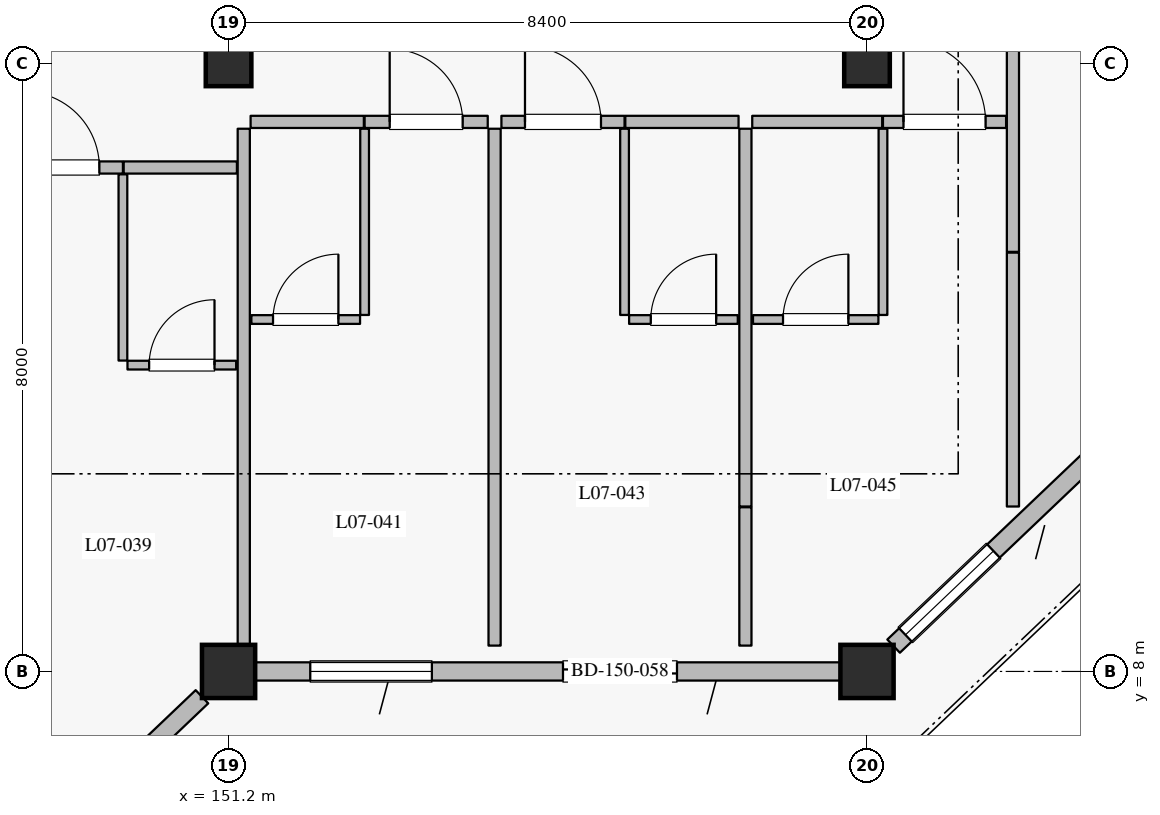
"""IFC4 building model, lengths in metres.
Left out: names, types, materials, properties, quantities, classifications, styles, units other than length and angle.
Written with IfcOpenShell. Run it as: python <this file> out.ifc"""

import sys

from ifc_helpers import new_model, si_unit, direction, frame, frame_2d, origin, origin_2d, place, context, subcontext, project, spatial, rectangle, extrude, element, fill, save


model = new_model("IFC4")
c1 = context("Model", 3, precision=1e-05, world=origin(), true_north=direction((0.0, 1.0)))
c2 = subcontext(c1, "Body", "Model", "MODEL_VIEW")
j1 = project(units=[si_unit("LENGTHUNIT", "METRE"), si_unit("PLANEANGLEUNIT", "RADIAN")], contexts=[c1])
p1 = place(None, origin())
s1 = spatial("IfcSite", under=j1, at=p1, CompositionType="ELEMENT")
p2 = place(p1, origin())
s2 = spatial("IfcBuilding", under=s1, at=p2, CompositionType="ELEMENT")
p3 = place(p2, frame((0.0, 0.0, 32.4)))
s3 = spatial("IfcBuildingStorey", under=s2, at=p3, CompositionType="ELEMENT", Elevation=32.4)
for number, where, z_axis, x_axis in (
    (1, (151.2, 8.0, 0.0), (0.0, 0.0, 1.0), (1.0, 0.0, 0.0)),
    (2, (159.6, 8.0, 0.0), (0.0, 0.0, 1.0), (1.0, 0.0, 0.0)),
):
    element("IfcColumn", number, at=place(p3, frame(where, z_axis=z_axis, x_axis=x_axis)), inside=s3, PredefinedType="COLUMN", context=c2, shape_type="SweptSolid", body=[
        extrude(rectangle(XDim=0.7, YDim=0.7, at=origin_2d()), origin(), (0.0, 0.0, 1.0), 3.6),
    ])
for number, where, z_axis, x_axis in (
    (3, (151.2, 16.0, 0.0), (0.0, 0.0, 1.0), (1.0, 0.0, 0.0)),
    (4, (159.6, 16.0, 0.0), (0.0, 0.0, 1.0), (1.0, 0.0, 0.0)),
):
    element("IfcColumn", number, at=place(p3, frame(where, z_axis=z_axis, x_axis=x_axis)), inside=s3, PredefinedType="COLUMN", context=c2, shape_type="SweptSolid", body=[
        extrude(rectangle(XDim=0.6, YDim=0.6, at=origin_2d()), origin(), (0.0, 0.0, 1.0), 3.6),
    ])
p4 = place(p3, frame((150.85, 7.667, 0.0), z_axis=(0.0, 0.0, 1.0), x_axis=(-0.724116091282, -0.689678103427, 0.0)))
e5 = element("IfcWall", 5, at=p4, inside=s3, PredefinedType="SOLIDWALL", context=c2, shape_type="SweptSolid", body=[
    extrude(rectangle(XDim=10.634, YDim=0.24, at=frame_2d((5.317, 0.0))), origin(), (0.0, 0.0, 1.0), 2.94),
])
p5 = place(p4, frame((1.08, 0.0, 0.0)))
e6 = element("IfcOpeningElement", 6, at=p5, cuts=e5, PredefinedType="OPENING", context=c2, shape_type="SweptSolid", body=[
    extrude(rectangle(XDim=1.5, YDim=2.25, at=frame_2d((0.75, 1.125))), frame((0.0, 0.13, 0.0), z_axis=(0.0, -1.0, 0.0), x_axis=(1.0, 0.0, 0.0)), (0.0, 0.0, 1.0), 0.26),
])
p6 = place(p4, frame((5.276, 0.0, 0.8)))
e7 = element("IfcOpeningElement", 7, at=p6, cuts=e5, PredefinedType="OPENING", context=c2, shape_type="SweptSolid", body=[
    extrude(rectangle(XDim=1.6, YDim=1.6, at=frame_2d((0.8, 0.8))), frame((0.0, 0.13, 0.0), z_axis=(0.0, -1.0, 0.0), x_axis=(1.0, 0.0, 0.0)), (0.0, 0.0, 1.0), 0.26),
])
p7 = place(p4, frame((8.764, 0.0, 0.8)))
e8 = element("IfcOpeningElement", 8, at=p7, cuts=e5, PredefinedType="OPENING", context=c2, shape_type="SweptSolid", body=[
    extrude(rectangle(XDim=1.6, YDim=1.6, at=frame_2d((0.8, 0.8))), frame((0.0, 0.13, 0.0), z_axis=(0.0, -1.0, 0.0), x_axis=(1.0, 0.0, 0.0)), (0.0, 0.0, 1.0), 0.26),
])
p8 = place(p3, frame((159.25, 8.0, 0.0), z_axis=(0.0, 0.0, 1.0), x_axis=(-1.0, 0.0, 0.0)))
e9 = element("IfcWall", 9, at=p8, inside=s3, PredefinedType="SOLIDWALL", context=c2, shape_type="SweptSolid", body=[
    extrude(rectangle(XDim=7.7, YDim=0.24, at=frame_2d((3.85, 0.0))), origin(), (0.0, 0.0, 1.0), 2.94),
])
p9 = place(p8, frame((2.15, 0.0, 0.0)))
e10 = element("IfcOpeningElement", 10, at=p9, cuts=e9, PredefinedType="OPENING", context=c2, shape_type="SweptSolid", body=[
    extrude(rectangle(XDim=1.5, YDim=2.25, at=frame_2d((0.75, 1.125))), frame((0.0, 0.13, 0.0), z_axis=(0.0, -1.0, 0.0), x_axis=(1.0, 0.0, 0.0)), (0.0, 0.0, 1.0), 0.26),
])
p10 = place(p8, frame((5.375, 0.0, 0.8)))
e11 = element("IfcOpeningElement", 11, at=p10, cuts=e9, PredefinedType="OPENING", context=c2, shape_type="SweptSolid", body=[
    extrude(rectangle(XDim=1.6, YDim=1.6, at=frame_2d((0.8, 0.8))), frame((0.0, 0.13, 0.0), z_axis=(0.0, -1.0, 0.0), x_axis=(1.0, 0.0, 0.0)), (0.0, 0.0, 1.0), 0.26),
])
p11 = place(p3, frame((167.65, 15.667, 0.0), z_axis=(0.0, 0.0, 1.0), x_axis=(-0.724105170588, -0.689689569247, 0.0)))
e12 = element("IfcWall", 12, at=p11, inside=s3, PredefinedType="SOLIDWALL", context=c2, shape_type="SweptSolid", body=[
    extrude(rectangle(XDim=10.634, YDim=0.24, at=frame_2d((5.317, 0.0))), origin(), (0.0, 0.0, 1.0), 2.89),
])
p12 = place(p11, frame((0.983, 0.0, 0.0)))
e13 = element("IfcOpeningElement", 13, at=p12, cuts=e12, PredefinedType="OPENING", context=c2, shape_type="SweptSolid", body=[
    extrude(rectangle(XDim=1.5, YDim=2.25, at=frame_2d((0.75, 1.125))), frame((0.0, 0.13, 0.0), z_axis=(0.0, -1.0, 0.0), x_axis=(1.0, 0.0, 0.0)), (0.0, 0.0, 1.0), 0.26),
])
p13 = place(p11, frame((5.035, 0.0, 0.8)))
e14 = element("IfcOpeningElement", 14, at=p13, cuts=e12, PredefinedType="OPENING", context=c2, shape_type="SweptSolid", body=[
    extrude(rectangle(XDim=2.0, YDim=1.75, at=frame_2d((1.0, 0.875))), frame((0.0, 0.13, 0.0), z_axis=(0.0, -1.0, 0.0), x_axis=(1.0, 0.0, 0.0)), (0.0, 0.0, 1.0), 0.26),
])
p14 = place(p11, frame((8.819, 0.0, 0.8)))
e15 = element("IfcOpeningElement", 15, at=p14, cuts=e12, PredefinedType="OPENING", context=c2, shape_type="SweptSolid", body=[
    extrude(rectangle(XDim=1.6, YDim=1.6, at=frame_2d((0.8, 0.8))), frame((0.0, 0.13, 0.0), z_axis=(0.0, -1.0, 0.0), x_axis=(1.0, 0.0, 0.0)), (0.0, 0.0, 1.0), 0.26),
])
p15 = place(p3, frame((148.19, 14.63, 0.0), z_axis=(0.0, 0.0, 1.0), x_axis=(1.0, 0.0, 0.0)))
e16 = element("IfcWall", 16, at=p15, inside=s3, PredefinedType="PARTITIONING", context=c2, shape_type="SweptSolid", body=[
    extrude(rectangle(XDim=1.62, YDim=0.16, at=frame_2d((0.81, 0.0))), origin(), (0.0, 0.0, 1.0), 3.335),
])
p16 = place(p15, frame((0.31, 0.0, 0.0)))
e17 = element("IfcOpeningElement", 17, at=p16, cuts=e16, PredefinedType="OPENING", context=c2, shape_type="SweptSolid", body=[
    extrude(rectangle(XDim=1.0, YDim=2.25, at=frame_2d((0.5, 1.125))), frame((0.0, 0.09, 0.0), z_axis=(0.0, -1.0, 0.0), x_axis=(1.0, 0.0, 0.0)), (0.0, 0.0, 1.0), 0.18),
])
p17 = place(p3, frame((149.82, 14.63, 0.0), z_axis=(0.0, 0.0, 1.0), x_axis=(1.0, 0.0, 0.0)))
e18 = element("IfcWall", 18, at=p17, inside=s3, PredefinedType="PARTITIONING", context=c2, shape_type="SweptSolid", body=[
    extrude(rectangle(XDim=1.49, YDim=0.16, at=frame_2d((0.745, 0.0))), origin(), (0.0, 0.0, 1.0), 3.335),
])
p18 = place(p3, frame((149.81, 12.09, 0.0), z_axis=(0.0, 0.0, 1.0), x_axis=(0.0, 1.0, 0.0)))
e19 = element("IfcWall", 19, at=p18, inside=s3, PredefinedType="PARTITIONING", context=c2, shape_type="SweptSolid", body=[
    extrude(rectangle(XDim=2.45, YDim=0.115, at=frame_2d((1.225, 0.0))), origin(), (0.0, 0.0, 1.0), 3.335),
])
p19 = place(p3, frame((149.87, 12.03, 0.0), z_axis=(0.0, 0.0, 1.0), x_axis=(1.0, 0.0, 0.0)))
e20 = element("IfcWall", 20, at=p19, inside=s3, PredefinedType="PARTITIONING", context=c2, shape_type="SweptSolid", body=[
    extrude(rectangle(XDim=1.43, YDim=0.115, at=frame_2d((0.715, 0.0))), origin(), (0.0, 0.0, 1.0), 3.335),
])
p20 = place(p19, frame((0.285, 0.0, 0.0)))
e21 = element("IfcOpeningElement", 21, at=p20, cuts=e20, PredefinedType="OPENING", context=c2, shape_type="SweptSolid", body=[
    extrude(rectangle(XDim=0.86, YDim=2.12, at=frame_2d((0.43, 1.06))), frame((0.0, 0.067, 0.0), z_axis=(0.0, -1.0, 0.0), x_axis=(1.0, 0.0, 0.0)), (0.0, 0.0, 1.0), 0.135),
])
p21 = place(p3, frame((151.49, 15.23, 0.0), z_axis=(0.0, 0.0, 1.0), x_axis=(1.0, 0.0, 0.0)))
e22 = element("IfcWall", 22, at=p21, inside=s3, PredefinedType="PARTITIONING", context=c2, shape_type="SweptSolid", body=[
    extrude(rectangle(XDim=1.49, YDim=0.16, at=frame_2d((0.745, 0.0))), origin(), (0.0, 0.0, 1.0), 3.335),
])
p22 = place(p3, frame((152.99, 15.23, 0.0), z_axis=(0.0, 0.0, 1.0), x_axis=(1.0, 0.0, 0.0)))
e23 = element("IfcWall", 23, at=p22, inside=s3, PredefinedType="PARTITIONING", context=c2, shape_type="SweptSolid", body=[
    extrude(rectangle(XDim=1.62, YDim=0.16, at=frame_2d((0.81, 0.0))), origin(), (0.0, 0.0, 1.0), 3.335),
])
p23 = place(p22, frame((0.33, 0.0, 0.0)))
e24 = element("IfcOpeningElement", 24, at=p23, cuts=e23, PredefinedType="OPENING", context=c2, shape_type="SweptSolid", body=[
    extrude(rectangle(XDim=0.96, YDim=2.2, at=frame_2d((0.48, 1.1))), frame((0.0, 0.09, 0.0), z_axis=(0.0, -1.0, 0.0), x_axis=(1.0, 0.0, 0.0)), (0.0, 0.0, 1.0), 0.18),
])
p24 = place(p3, frame((152.99, 12.69, 0.0), z_axis=(0.0, 0.0, 1.0), x_axis=(0.0, 1.0, 0.0)))
e25 = element("IfcWall", 25, at=p24, inside=s3, PredefinedType="PARTITIONING", context=c2, shape_type="SweptSolid", body=[
    extrude(rectangle(XDim=2.45, YDim=0.115, at=frame_2d((1.225, 0.0))), origin(), (0.0, 0.0, 1.0), 3.335),
])
p25 = place(p3, frame((151.5, 12.63, 0.0), z_axis=(0.0, 0.0, 1.0), x_axis=(1.0, 0.0, 0.0)))
e26 = element("IfcWall", 26, at=p25, inside=s3, PredefinedType="PARTITIONING", context=c2, shape_type="SweptSolid", body=[
    extrude(rectangle(XDim=1.43, YDim=0.115, at=frame_2d((0.715, 0.0))), origin(), (0.0, 0.0, 1.0), 3.335),
])
p26 = place(p25, frame((0.285, 0.0, 0.0)))
e27 = element("IfcOpeningElement", 27, at=p26, cuts=e26, PredefinedType="OPENING", context=c2, shape_type="SweptSolid", body=[
    extrude(rectangle(XDim=0.86, YDim=2.12, at=frame_2d((0.43, 1.06))), frame((0.0, 0.067, 0.0), z_axis=(0.0, -1.0, 0.0), x_axis=(1.0, 0.0, 0.0)), (0.0, 0.0, 1.0), 0.135),
])
p27 = place(p3, frame((151.4, 8.34, 0.0), z_axis=(0.0, 0.0, 1.0), x_axis=(0.0, 1.0, 0.0)))
e28 = element("IfcWall", 28, at=p27, inside=s3, PredefinedType="PARTITIONING", context=c2, shape_type="SweptSolid", body=[
    extrude(rectangle(XDim=6.8, YDim=0.16, at=frame_2d((3.4, 0.0))), origin(), (0.0, 0.0, 1.0), 2.74),
])
p28 = place(p3, frame((154.79, 15.23, 0.0), z_axis=(0.0, 0.0, 1.0), x_axis=(1.0, 0.0, 0.0)))
e29 = element("IfcWall", 29, at=p28, inside=s3, PredefinedType="PARTITIONING", context=c2, shape_type="SweptSolid", body=[
    extrude(rectangle(XDim=1.62, YDim=0.16, at=frame_2d((0.81, 0.0))), origin(), (0.0, 0.0, 1.0), 3.335),
])
p29 = place(p28, frame((0.31, 0.0, 0.0)))
e30 = element("IfcOpeningElement", 30, at=p29, cuts=e29, PredefinedType="OPENING", context=c2, shape_type="SweptSolid", body=[
    extrude(rectangle(XDim=1.0, YDim=2.25, at=frame_2d((0.5, 1.125))), frame((0.0, 0.09, 0.0), z_axis=(0.0, -1.0, 0.0), x_axis=(1.0, 0.0, 0.0)), (0.0, 0.0, 1.0), 0.18),
])
p30 = place(p3, frame((156.42, 15.23, 0.0), z_axis=(0.0, 0.0, 1.0), x_axis=(1.0, 0.0, 0.0)))
e31 = element("IfcWall", 31, at=p30, inside=s3, PredefinedType="PARTITIONING", context=c2, shape_type="SweptSolid", body=[
    extrude(rectangle(XDim=1.49, YDim=0.16, at=frame_2d((0.745, 0.0))), origin(), (0.0, 0.0, 1.0), 3.335),
])
p31 = place(p3, frame((156.41, 12.69, 0.0), z_axis=(0.0, 0.0, 1.0), x_axis=(0.0, 1.0, 0.0)))
e32 = element("IfcWall", 32, at=p31, inside=s3, PredefinedType="PARTITIONING", context=c2, shape_type="SweptSolid", body=[
    extrude(rectangle(XDim=2.45, YDim=0.115, at=frame_2d((1.225, 0.0))), origin(), (0.0, 0.0, 1.0), 3.335),
])
p32 = place(p3, frame((156.47, 12.63, 0.0), z_axis=(0.0, 0.0, 1.0), x_axis=(1.0, 0.0, 0.0)))
e33 = element("IfcWall", 33, at=p32, inside=s3, PredefinedType="PARTITIONING", context=c2, shape_type="SweptSolid", body=[
    extrude(rectangle(XDim=1.43, YDim=0.115, at=frame_2d((0.715, 0.0))), origin(), (0.0, 0.0, 1.0), 3.335),
])
p33 = place(p32, frame((0.285, 0.0, 0.0)))
e34 = element("IfcOpeningElement", 34, at=p33, cuts=e33, PredefinedType="OPENING", context=c2, shape_type="SweptSolid", body=[
    extrude(rectangle(XDim=0.86, YDim=2.12, at=frame_2d((0.43, 1.06))), frame((0.0, 0.067, 0.0), z_axis=(0.0, -1.0, 0.0), x_axis=(1.0, 0.0, 0.0)), (0.0, 0.0, 1.0), 0.135),
])
p34 = place(p3, frame((154.7, 8.34, 0.0), z_axis=(0.0, 0.0, 1.0), x_axis=(0.0, 1.0, 0.0)))
e35 = element("IfcWall", 35, at=p34, inside=s3, PredefinedType="PARTITIONING", context=c2, shape_type="SweptSolid", body=[
    extrude(rectangle(XDim=6.8, YDim=0.16, at=frame_2d((3.4, 0.0))), origin(), (0.0, 0.0, 1.0), 3.335),
])
p35 = place(p3, frame((158.0, 8.34, 0.0), z_axis=(0.0, 0.0, 1.0), x_axis=(0.0, 1.0, 0.0)))
e36 = element("IfcWall", 36, at=p35, inside=s3, PredefinedType="PARTITIONING", context=c2, shape_type="SweptSolid", body=[
    extrude(rectangle(XDim=1.82, YDim=0.16, at=frame_2d((0.91, 0.0))), origin(), (0.0, 0.0, 1.0), 3.335),
])
p36 = place(p3, frame((158.09, 15.23, 0.0), z_axis=(0.0, 0.0, 1.0), x_axis=(1.0, 0.0, 0.0)))
e37 = element("IfcWall", 37, at=p36, inside=s3, PredefinedType="PARTITIONING", context=c2, shape_type="SweptSolid", body=[
    extrude(rectangle(XDim=1.71, YDim=0.16, at=frame_2d((0.855, 0.0))), origin(), (0.0, 0.0, 1.0), 3.335),
])
p37 = place(p3, frame((159.81, 15.23, 0.0), z_axis=(0.0, 0.0, 1.0), x_axis=(1.0, 0.0, 0.0)))
e38 = element("IfcWall", 38, at=p37, inside=s3, PredefinedType="PARTITIONING", context=c2, shape_type="SweptSolid", body=[
    extrude(rectangle(XDim=1.62, YDim=0.16, at=frame_2d((0.81, 0.0))), origin(), (0.0, 0.0, 1.0), 3.335),
])
p38 = place(p37, frame((0.27, 0.0, 0.0)))
e39 = element("IfcOpeningElement", 39, at=p38, cuts=e38, PredefinedType="OPENING", context=c2, shape_type="SweptSolid", body=[
    extrude(rectangle(XDim=1.08, YDim=2.3, at=frame_2d((0.54, 1.15))), frame((0.0, 0.09, 0.0), z_axis=(0.0, -1.0, 0.0), x_axis=(1.0, 0.0, 0.0)), (0.0, 0.0, 1.0), 0.18),
])
p39 = place(p3, frame((159.81, 12.69, 0.0), z_axis=(0.0, 0.0, 1.0), x_axis=(0.0, 1.0, 0.0)))
e40 = element("IfcWall", 40, at=p39, inside=s3, PredefinedType="PARTITIONING", context=c2, shape_type="SweptSolid", body=[
    extrude(rectangle(XDim=2.45, YDim=0.115, at=frame_2d((1.225, 0.0))), origin(), (0.0, 0.0, 1.0), 2.74),
])
p40 = place(p3, frame((158.1, 12.63, 0.0), z_axis=(0.0, 0.0, 1.0), x_axis=(1.0, 0.0, 0.0)))
e41 = element("IfcWall", 41, at=p40, inside=s3, PredefinedType="PARTITIONING", context=c2, shape_type="SweptSolid", body=[
    extrude(rectangle(XDim=1.65, YDim=0.115, at=frame_2d((0.825, 0.0))), origin(), (0.0, 0.0, 1.0), 3.335),
])
p41 = place(p40, frame((0.395, 0.0, 0.0)))
e42 = element("IfcOpeningElement", 42, at=p41, cuts=e41, PredefinedType="OPENING", context=c2, shape_type="SweptSolid", body=[
    extrude(rectangle(XDim=0.86, YDim=2.12, at=frame_2d((0.43, 1.06))), frame((0.0, 0.067, 0.0), z_axis=(0.0, -1.0, 0.0), x_axis=(1.0, 0.0, 0.0)), (0.0, 0.0, 1.0), 0.135),
])
p42 = place(p3, frame((158.0, 10.17, 0.0), z_axis=(0.0, 0.0, 1.0), x_axis=(0.0, 1.0, 0.0)))
e43 = element("IfcWall", 43, at=p42, inside=s3, PredefinedType="PARTITIONING", context=c2, shape_type="SweptSolid", body=[
    extrude(rectangle(XDim=4.97, YDim=0.16, at=frame_2d((2.485, 0.0))), origin(), (0.0, 0.0, 1.0), 3.335),
])
p43 = place(p3, frame((161.52, 10.17, 0.0), z_axis=(0.0, 0.0, 1.0), x_axis=(0.0, 1.0, 0.0)))
e44 = element("IfcWall", 44, at=p43, inside=s3, PredefinedType="PARTITIONING", context=c2, shape_type="SweptSolid", body=[
    extrude(rectangle(XDim=3.34, YDim=0.16, at=frame_2d((1.67, 0.0))), origin(), (0.0, 0.0, 1.0), 3.335),
])
p44 = place(p3, frame((161.52, 13.52, 0.0), z_axis=(0.0, 0.0, 1.0), x_axis=(0.0, 1.0, 0.0)))
e45 = element("IfcWall", 45, at=p44, inside=s3, PredefinedType="PARTITIONING", context=c2, shape_type="SweptSolid", body=[
    extrude(rectangle(XDim=9.55, YDim=0.16, at=frame_2d((4.775, 0.0))), origin(), (0.0, 0.0, 1.0), 3.335),
])
p45 = place(p9, origin())
e46 = element("IfcDoor", 46, at=p45, inside=s3, OperationType="SLIDING_TO_LEFT", PredefinedType="DOOR", context=c2, shape_type="SweptSolid", body=[
    extrude(rectangle(XDim=1.5, YDim=2.25, at=frame_2d((0.75, 1.125))), frame((0.0, 0.025, 0.0), z_axis=(0.0, -1.0, 0.0), x_axis=(1.0, 0.0, 0.0)), (0.0, 0.0, 1.0), 0.05),
])
fill(e10, e46)
p46 = place(p10, origin())
e47 = element("IfcWindow", 47, at=p46, inside=s3, PartitioningType="SINGLE_PANEL", PredefinedType="WINDOW", context=c2, shape_type="SweptSolid", body=[
    extrude(rectangle(XDim=1.6, YDim=1.6, at=frame_2d((0.8, 0.8))), frame((0.0, 0.03, 0.0), z_axis=(0.0, -1.0, 0.0), x_axis=(1.0, 0.0, 0.0)), (0.0, 0.0, 1.0), 0.06),
])
fill(e11, e47)
p47 = place(p14, origin())
e48 = element("IfcWindow", 48, at=p47, inside=s3, PartitioningType="SINGLE_PANEL", PredefinedType="WINDOW", context=c2, shape_type="SweptSolid", body=[
    extrude(rectangle(XDim=1.6, YDim=1.6, at=frame_2d((0.8, 0.8))), frame((0.0, 0.03, 0.0), z_axis=(0.0, -1.0, 0.0), x_axis=(1.0, 0.0, 0.0)), (0.0, 0.0, 1.0), 0.06),
])
fill(e15, e48)
p48 = place(p16, origin())
e49 = element("IfcDoor", 49, at=p48, inside=s3, OperationType="SINGLE_SWING_LEFT", PredefinedType="DOOR", context=c2, shape_type="SweptSolid", body=[
    extrude(rectangle(XDim=1.0, YDim=2.25, at=frame_2d((0.5, 1.125))), frame((0.0, 0.025, 0.0), z_axis=(0.0, -1.0, 0.0), x_axis=(1.0, 0.0, 0.0)), (0.0, 0.0, 1.0), 0.05),
])
fill(e17, e49)
p49 = place(p20, origin())
e50 = element("IfcDoor", 50, at=p49, inside=s3, OperationType="SINGLE_SWING_RIGHT", PredefinedType="DOOR", context=c2, shape_type="SweptSolid", body=[
    extrude(rectangle(XDim=0.86, YDim=2.12, at=frame_2d((0.43, 1.06))), frame((0.0, 0.025, 0.0), z_axis=(0.0, -1.0, 0.0), x_axis=(1.0, 0.0, 0.0)), (0.0, 0.0, 1.0), 0.05),
])
fill(e21, e50)
p50 = place(p23, origin())
e51 = element("IfcDoor", 51, at=p50, inside=s3, OperationType="SINGLE_SWING_LEFT", PredefinedType="DOOR", context=c2, shape_type="SweptSolid", body=[
    extrude(rectangle(XDim=0.96, YDim=2.2, at=frame_2d((0.48, 1.1))), frame((0.0, 0.025, 0.0), z_axis=(0.0, -1.0, 0.0), x_axis=(1.0, 0.0, 0.0)), (0.0, 0.0, 1.0), 0.05),
])
fill(e24, e51)
p51 = place(p26, origin())
e52 = element("IfcDoor", 52, at=p51, inside=s3, OperationType="SINGLE_SWING_RIGHT", PredefinedType="DOOR", context=c2, shape_type="SweptSolid", body=[
    extrude(rectangle(XDim=0.86, YDim=2.12, at=frame_2d((0.43, 1.06))), frame((0.0, 0.025, 0.0), z_axis=(0.0, -1.0, 0.0), x_axis=(1.0, 0.0, 0.0)), (0.0, 0.0, 1.0), 0.05),
])
fill(e27, e52)
p52 = place(p29, origin())
e53 = element("IfcDoor", 53, at=p52, inside=s3, OperationType="SINGLE_SWING_LEFT", PredefinedType="DOOR", context=c2, shape_type="SweptSolid", body=[
    extrude(rectangle(XDim=1.0, YDim=2.25, at=frame_2d((0.5, 1.125))), frame((0.0, 0.025, 0.0), z_axis=(0.0, -1.0, 0.0), x_axis=(1.0, 0.0, 0.0)), (0.0, 0.0, 1.0), 0.05),
])
fill(e30, e53)
p53 = place(p33, origin())
e54 = element("IfcDoor", 54, at=p53, inside=s3, OperationType="SINGLE_SWING_RIGHT", PredefinedType="DOOR", context=c2, shape_type="SweptSolid", body=[
    extrude(rectangle(XDim=0.86, YDim=2.12, at=frame_2d((0.43, 1.06))), frame((0.0, 0.025, 0.0), z_axis=(0.0, -1.0, 0.0), x_axis=(1.0, 0.0, 0.0)), (0.0, 0.0, 1.0), 0.05),
])
fill(e34, e54)
p54 = place(p38, origin())
e55 = element("IfcDoor", 55, at=p54, inside=s3, OperationType="SINGLE_SWING_LEFT", PredefinedType="DOOR", context=c2, shape_type="SweptSolid", body=[
    extrude(rectangle(XDim=1.08, YDim=2.3, at=frame_2d((0.54, 1.15))), frame((0.0, 0.025, 0.0), z_axis=(0.0, -1.0, 0.0), x_axis=(1.0, 0.0, 0.0)), (0.0, 0.0, 1.0), 0.05),
])
fill(e39, e55)
p55 = place(p41, origin())
e56 = element("IfcDoor", 56, at=p55, inside=s3, OperationType="SINGLE_SWING_RIGHT", PredefinedType="DOOR", context=c2, shape_type="SweptSolid", body=[
    extrude(rectangle(XDim=0.86, YDim=2.12, at=frame_2d((0.43, 1.06))), frame((0.0, 0.025, 0.0), z_axis=(0.0, -1.0, 0.0), x_axis=(1.0, 0.0, 0.0)), (0.0, 0.0, 1.0), 0.05),
])
fill(e42, e56)
save(model, sys.argv[1])
